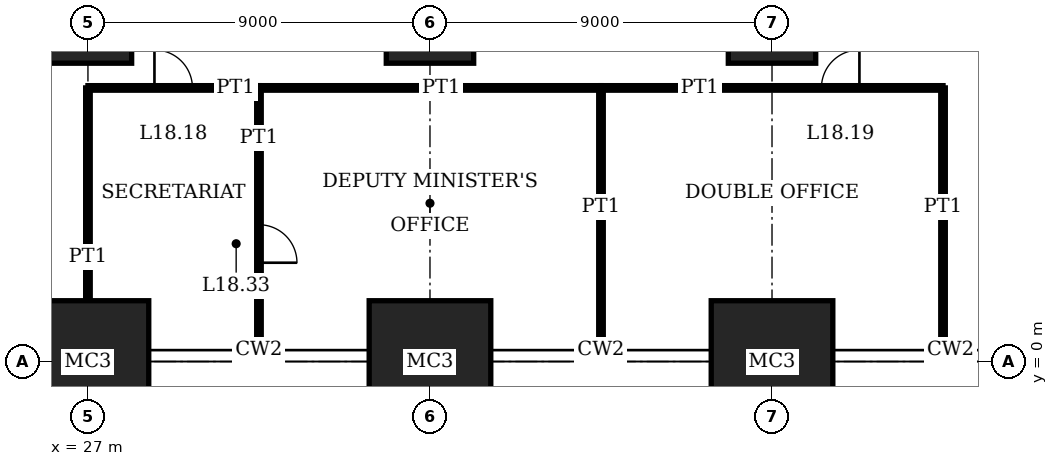
"""IFC4 building model, lengths in metres.
Left out: names, types, materials, properties, quantities, classifications, styles, units other than length and angle.
Written with IfcOpenShell. Run it as: python <this file> out.ifc"""

import sys

from ifc_helpers import new_model, si_unit, direction, frame, frame_2d, origin, origin_2d, place, context, subcontext, project, spatial, rectangle, extrude, element, fill, save


model = new_model("IFC4")
c1 = context("Model", 3, precision=1e-05, world=origin(), true_north=direction((0.0, 1.0)))
c2 = subcontext(c1, "Body", "Model", "MODEL_VIEW")
j1 = project(units=[si_unit("LENGTHUNIT", "METRE"), si_unit("PLANEANGLEUNIT", "RADIAN")], contexts=[c1])
p1 = place(None, origin())
s1 = spatial("IfcSite", under=j1, at=p1, CompositionType="ELEMENT")
p2 = place(p1, origin())
s2 = spatial("IfcBuilding", under=s1, at=p2, CompositionType="ELEMENT")
p3 = place(p2, frame((0.0, 0.0, 75.8)))
s3 = spatial("IfcBuildingStorey", under=s2, at=p3, CompositionType="ELEMENT", Elevation=75.8)
p4 = place(p3, frame((27.0, 0.0, 0.0), z_axis=(0.0, 0.0, 1.0), x_axis=(1.0, 0.0, 0.0)))
e1 = element("IfcColumn", 1, at=p4, inside=s3, PredefinedType="COLUMN", context=c2, shape_type="SweptSolid", body=[
    extrude(rectangle(XDim=3.2, YDim=3.2, at=origin_2d()), origin(), (0.0, 0.0, 1.0), 4.2),
])
p5 = place(p3, frame((27.0, 9.0, 0.0), z_axis=(0.0, 0.0, 1.0), x_axis=(1.0, 0.0, 0.0)))
e2 = element("IfcColumn", 2, at=p5, inside=s3, PredefinedType="COLUMN", context=c2, shape_type="SweptSolid", body=[
    extrude(rectangle(XDim=2.3, YDim=2.3, at=origin_2d()), origin(), (0.0, 0.0, 1.0), 4.2),
])
p6 = place(p3, frame((36.0, 0.0, 0.0), z_axis=(0.0, 0.0, 1.0), x_axis=(1.0, 0.0, 0.0)))
e3 = element("IfcColumn", 3, at=p6, inside=s3, PredefinedType="COLUMN", context=c2, shape_type="SweptSolid", body=[
    extrude(rectangle(XDim=3.2, YDim=3.2, at=origin_2d()), origin(), (0.0, 0.0, 1.0), 4.2),
])
p7 = place(p3, frame((36.0, 9.0, 0.0), z_axis=(0.0, 0.0, 1.0), x_axis=(1.0, 0.0, 0.0)))
e4 = element("IfcColumn", 4, at=p7, inside=s3, PredefinedType="COLUMN", context=c2, shape_type="SweptSolid", body=[
    extrude(rectangle(XDim=2.3, YDim=2.3, at=origin_2d()), origin(), (0.0, 0.0, 1.0), 4.2),
])
p8 = place(p3, frame((45.0, 0.0, 0.0), z_axis=(0.0, 0.0, 1.0), x_axis=(1.0, 0.0, 0.0)))
e5 = element("IfcColumn", 5, at=p8, inside=s3, PredefinedType="COLUMN", context=c2, shape_type="SweptSolid", body=[
    extrude(rectangle(XDim=3.2, YDim=3.2, at=origin_2d()), origin(), (0.0, 0.0, 1.0), 4.2),
])
p9 = place(p3, frame((45.0, 9.0, 0.0), z_axis=(0.0, 0.0, 1.0), x_axis=(1.0, 0.0, 0.0)))
e6 = element("IfcColumn", 6, at=p9, inside=s3, PredefinedType="COLUMN", context=c2, shape_type="SweptSolid", body=[
    extrude(rectangle(XDim=2.3, YDim=2.3, at=origin_2d()), origin(), (0.0, 0.0, 1.0), 4.2),
])
p10 = place(p3, frame((27.0, 7.2, 0.0), z_axis=(0.0, 0.0, 1.0), x_axis=(1.0, 0.0, 0.0)))
e7 = element("IfcWall", 7, at=p10, inside=s3, PredefinedType="PARTITIONING", context=c2, shape_type="SweptSolid", body=[
    extrude(rectangle(XDim=4.5, YDim=0.12, at=frame_2d((2.25, 0.0))), origin(), (0.0, 0.0, 1.0), 3.85),
])
p11 = place(p10, frame((1.75, 0.0, 0.0)))
e8 = element("IfcOpeningElement", 8, at=p11, cuts=e7, PredefinedType="OPENING", context=c2, shape_type="SweptSolid", body=[
    extrude(rectangle(XDim=1.0, YDim=2.4, at=frame_2d((0.5, 1.2))), frame((0.0, 0.07, 0.0), z_axis=(0.0, -1.0, 0.0), x_axis=(1.0, 0.0, 0.0)), (0.0, 0.0, 1.0), 0.14),
])
p12 = place(p3, frame((31.5, 7.2, 0.0), z_axis=(0.0, 0.0, 1.0), x_axis=(1.0, 0.0, 0.0)))
e9 = element("IfcWall", 9, at=p12, inside=s3, PredefinedType="PARTITIONING", context=c2, shape_type="SweptSolid", body=[
    extrude(rectangle(XDim=9.0, YDim=0.12, at=frame_2d((4.5, 0.0))), origin(), (0.0, 0.0, 1.0), 3.85),
])
p13 = place(p3, frame((40.5, 7.2, 0.0), z_axis=(0.0, 0.0, 1.0), x_axis=(1.0, 0.0, 0.0)))
e10 = element("IfcWall", 10, at=p13, inside=s3, PredefinedType="PARTITIONING", context=c2, shape_type="SweptSolid", body=[
    extrude(rectangle(XDim=9.0, YDim=0.12, at=frame_2d((4.5, 0.0))), origin(), (0.0, 0.0, 1.0), 3.85),
])
p14 = place(p13, frame((5.8, 0.0, 0.0)))
e11 = element("IfcOpeningElement", 11, at=p14, cuts=e10, PredefinedType="OPENING", context=c2, shape_type="SweptSolid", body=[
    extrude(rectangle(XDim=1.0, YDim=2.4, at=frame_2d((0.5, 1.2))), frame((0.0, 0.07, 0.0), z_axis=(0.0, -1.0, 0.0), x_axis=(1.0, 0.0, 0.0)), (0.0, 0.0, 1.0), 0.14),
])
p15 = place(p3, frame((27.0, 1.6, 0.0), z_axis=(0.0, 0.0, 1.0), x_axis=(0.0, 1.0, 0.0)))
e12 = element("IfcWall", 12, at=p15, inside=s3, PredefinedType="PARTITIONING", context=c2, shape_type="SweptSolid", body=[
    extrude(rectangle(XDim=5.6, YDim=0.12, at=frame_2d((2.8, 0.0))), origin(), (0.0, 0.0, 1.0), 3.25),
])
p16 = place(p3, frame((31.5, 0.31, 0.0), z_axis=(0.0, 0.0, 1.0), x_axis=(0.0, 1.0, 0.0)))
e13 = element("IfcWall", 13, at=p16, inside=s3, PredefinedType="PARTITIONING", context=c2, shape_type="SweptSolid", body=[
    extrude(rectangle(XDim=6.89, YDim=0.12, at=frame_2d((3.445, 0.0))), origin(), (0.0, 0.0, 1.0), 3.85),
])
p17 = place(p16, frame((2.29, 0.0, 0.0)))
e14 = element("IfcOpeningElement", 14, at=p17, cuts=e13, PredefinedType="OPENING", context=c2, shape_type="SweptSolid", body=[
    extrude(rectangle(XDim=1.0, YDim=2.4, at=frame_2d((0.5, 1.2))), frame((0.0, 0.07, 0.0), z_axis=(0.0, -1.0, 0.0), x_axis=(1.0, 0.0, 0.0)), (0.0, 0.0, 1.0), 0.14),
])
for number, where, z_axis, x_axis in (
    (15, (40.5, 0.31, 0.0), (0.0, 0.0, 1.0), (0.0, 1.0, 0.0)),
    (16, (49.5, 0.31, 0.0), (0.0, 0.0, 1.0), (0.0, 1.0, 0.0)),
):
    element("IfcWall", number, at=place(p3, frame(where, z_axis=z_axis, x_axis=x_axis)), inside=s3, PredefinedType="PARTITIONING", context=c2, shape_type="SweptSolid", body=[
        extrude(rectangle(XDim=6.89, YDim=0.12, at=frame_2d((3.445, 0.0))), origin(), (0.0, 0.0, 1.0), 3.85),
    ])
p18 = place(p11, origin())
e17 = element("IfcDoor", 17, at=p18, inside=s3, OperationType="SINGLE_SWING_RIGHT", PredefinedType="DOOR", context=c2, shape_type="SweptSolid", body=[
    extrude(rectangle(XDim=1.0, YDim=2.4, at=frame_2d((0.5, 1.2))), frame((0.0, 0.025, 0.0), z_axis=(0.0, -1.0, 0.0), x_axis=(1.0, 0.0, 0.0)), (0.0, 0.0, 1.0), 0.05),
])
fill(e8, e17)
p19 = place(p14, origin())
e18 = element("IfcDoor", 18, at=p19, inside=s3, OperationType="SINGLE_SWING_LEFT", PredefinedType="DOOR", context=c2, shape_type="SweptSolid", body=[
    extrude(rectangle(XDim=1.0, YDim=2.4, at=frame_2d((0.5, 1.2))), frame((0.0, 0.025, 0.0), z_axis=(0.0, -1.0, 0.0), x_axis=(1.0, 0.0, 0.0)), (0.0, 0.0, 1.0), 0.05),
])
fill(e11, e18)
p20 = place(p17, origin())
e19 = element("IfcDoor", 19, at=p20, inside=s3, OperationType="SINGLE_SWING_LEFT", PredefinedType="DOOR", context=c2, shape_type="SweptSolid", body=[
    extrude(rectangle(XDim=1.0, YDim=2.4, at=frame_2d((0.5, 1.2))), frame((0.0, 0.025, 0.0), z_axis=(0.0, -1.0, 0.0), x_axis=(1.0, 0.0, 0.0)), (0.0, 0.0, 1.0), 0.05),
])
fill(e14, e19)
save(model, sys.argv[1])
